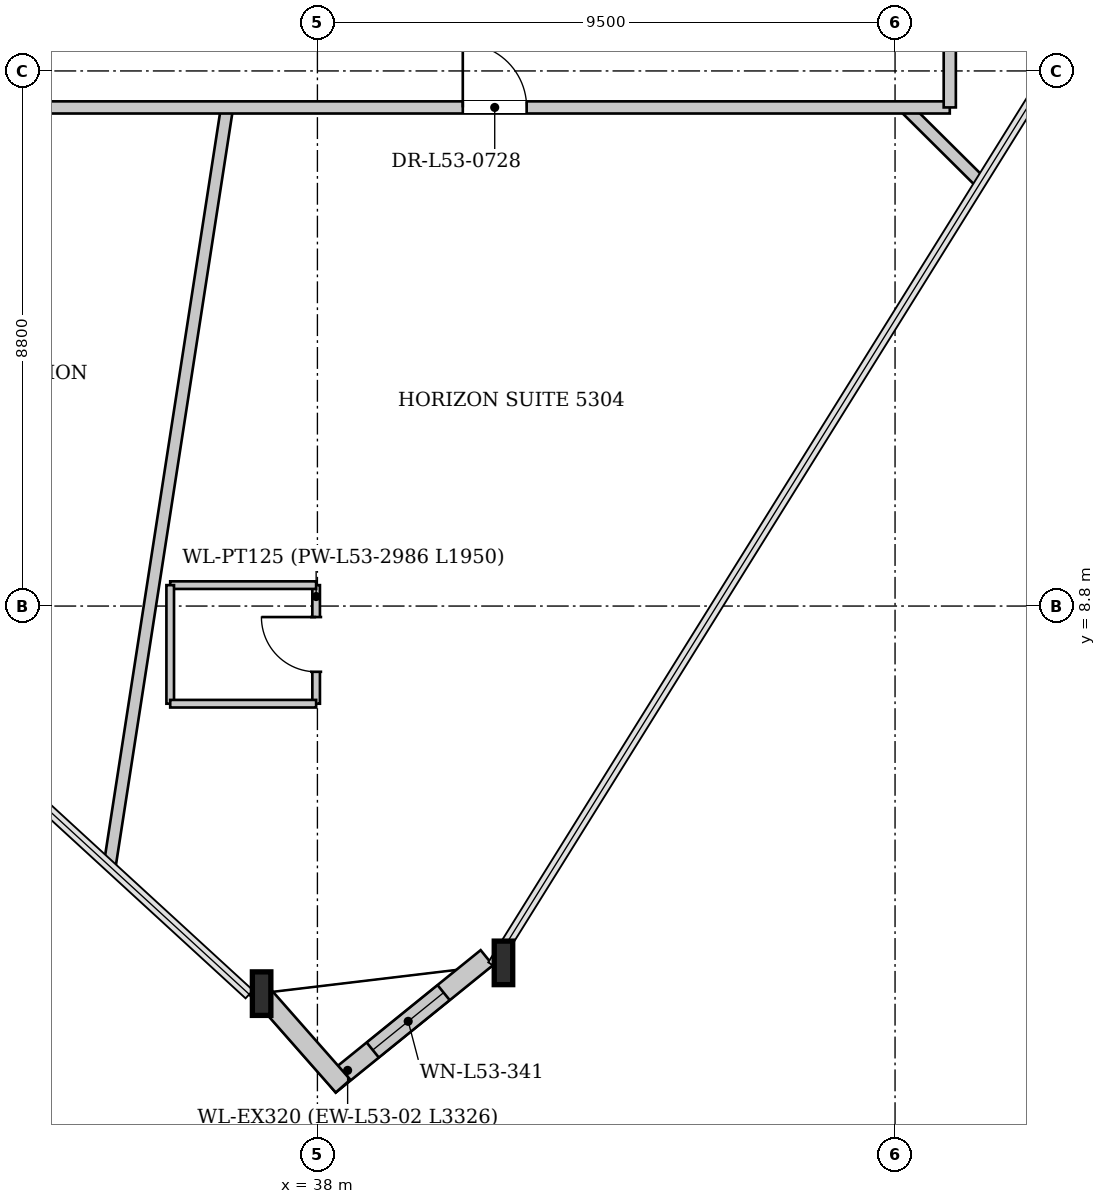
"""IFC4 building model, lengths in metres.
Left out: names, types, materials, properties, quantities, classifications, styles, units other than length and angle.
Written with IfcOpenShell. Run it as: python <this file> out.ifc"""

import sys

from ifc_helpers import new_model, si_unit, direction, frame, frame_2d, origin, origin_2d, place, context, subcontext, project, spatial, rectangle, i_section, extrude, source, transform, mapped, element, fill, save


model = new_model("IFC4")
c1 = context("Model", 3, precision=1e-05, world=origin(), true_north=direction((0.0, 1.0)))
c2 = subcontext(c1, "Body", "Model", "MODEL_VIEW")
j1 = project(units=[si_unit("LENGTHUNIT", "METRE"), si_unit("PLANEANGLEUNIT", "RADIAN")], contexts=[c1])
p1 = place(None, origin())
s1 = spatial("IfcSite", under=j1, at=p1, CompositionType="ELEMENT")
p2 = place(p1, origin())
s2 = spatial("IfcBuilding", under=s1, at=p2, CompositionType="ELEMENT")
p3 = place(p2, frame((0.0, 0.0, 200.3)))
s3 = spatial("IfcBuildingStorey", under=s2, at=p3, CompositionType="ELEMENT", Elevation=200.3)
m1 = source(origin(), c2, "Body", "SweptSolid", [
    extrude(i_section(OverallWidth=0.304, OverallDepth=0.716, WebThickness=0.021, FlangeThickness=0.04, at=origin_2d()), origin(), (0.0, 0.0, 1.0), 3.856),
])
p4 = place(p3, frame((36.879, 2.415, 0.0), z_axis=(0.105342028632, 0.005887505206, 0.994418621249), x_axis=(-0.055802338167, 0.998441835589, 0.0)))
e1 = element("IfcColumn", 1, at=p4, inside=s3, PredefinedType="COLUMN", context=c2, shape_type="MappedRepresentation", body=[
    mapped(m1, transform((0.0, 0.0, 0.0), x_axis=(1.0, 0.0, 0.0), y_axis=(0.0, 1.0, 0.0), z_axis=(0.0, 0.0, 1.0), scale=1.0)),
])
m2 = source(origin(), c2, "Body", "SweptSolid", [
    extrude(i_section(OverallWidth=0.304, OverallDepth=0.716, WebThickness=0.021, FlangeThickness=0.04, at=origin_2d()), origin(), (0.0, 0.0, 1.0), 3.852),
])
p5 = place(p3, frame((40.886, 2.893, 0.0), z_axis=(0.090202649582, 0.02034789214, 0.995715544367), x_axis=(-0.220050460577, 0.975488490347, 0.0)))
e2 = element("IfcColumn", 2, at=p5, inside=s3, PredefinedType="COLUMN", context=c2, shape_type="MappedRepresentation", body=[
    mapped(m2, transform((0.0, 0.0, 0.0), x_axis=(1.0, 0.0, 0.0), y_axis=(0.0, 1.0, 0.0), z_axis=(0.0, 0.0, 1.0), scale=1.0)),
])
p6 = place(p3, frame((40.785, 3.017, 0.0), z_axis=(0.0, 0.0, 1.0), x_axis=(-0.77721751888, -0.629232014718, 0.0)))
e3 = element("IfcWall", 3, at=p6, inside=s3, PredefinedType="SOLIDWALL", context=c2, shape_type="SweptSolid", body=[
    extrude(rectangle(XDim=3.326, YDim=0.32, at=frame_2d((1.663, 0.0))), origin(), (0.0, 0.0, 1.0), 2.972),
])
p7 = place(p6, frame((0.913, 0.0, 0.552)))
e4 = element("IfcOpeningElement", 4, at=p7, cuts=e3, PredefinedType="OPENING", context=c2, shape_type="SweptSolid", body=[
    extrude(rectangle(XDim=1.5, YDim=2.3, at=frame_2d((0.75, 1.15))), frame((0.0, 0.17, 0.0), z_axis=(0.0, -1.0, 0.0), x_axis=(1.0, 0.0, 0.0)), (0.0, 0.0, 1.0), 0.34),
])
p8 = place(p3, frame((38.421, 0.906, 0.0), z_axis=(0.0, 0.0, 1.0), x_axis=(-0.660863197415, 0.750506385251, 0.0)))
e5 = element("IfcWall", 5, at=p8, inside=s3, PredefinedType="SOLIDWALL", context=c2, shape_type="SweptSolid", body=[
    extrude(rectangle(XDim=2.152, YDim=0.32, at=frame_2d((1.076, 0.0))), origin(), (0.0, 0.0, 1.0), 2.972),
])
p9 = place(p3, frame((36.514, 17.0, 0.0), z_axis=(0.0, 0.0, 1.0), x_axis=(-0.152982434714, -0.988228908031, 0.0)))
e6 = element("IfcWall", 6, at=p9, inside=s3, PredefinedType="PARTITIONING", context=c2, shape_type="SweptSolid", body=[
    extrude(rectangle(XDim=12.59, YDim=0.2, at=frame_2d((6.295, 0.0))), origin(), (0.0, 0.0, 1.0), 3.58),
])
p10 = place(p3, frame((47.667, 17.0, 0.0), z_axis=(0.0, 0.0, 1.0), x_axis=(0.709519367243, -0.704685935369, 0.0)))
e7 = element("IfcWall", 7, at=p10, inside=s3, PredefinedType="PARTITIONING", context=c2, shape_type="SweptSolid", body=[
    extrude(rectangle(XDim=1.717, YDim=0.2, at=frame_2d((0.859, 0.0))), origin(), (0.0, 0.0, 1.0), 3.58),
])
p11 = place(p3, frame((37.979, 7.194, 0.0), z_axis=(0.0, 0.0, 1.0), x_axis=(0.0, 1.0, 0.0)))
e8 = element("IfcWall", 8, at=p11, inside=s3, PredefinedType="PARTITIONING", context=c2, shape_type="SweptSolid", body=[
    extrude(rectangle(XDim=1.95, YDim=0.125, at=frame_2d((0.975, 0.0))), origin(), (0.0, 0.0, 1.0), 3.58),
])
p12 = place(p11, frame((0.525, 0.0, 0.0)))
e9 = element("IfcOpeningElement", 9, at=p12, cuts=e8, PredefinedType="OPENING", context=c2, shape_type="SweptSolid", body=[
    extrude(rectangle(XDim=0.9, YDim=2.1, at=frame_2d((0.45, 1.05))), frame((0.0, 0.073, 0.0), z_axis=(0.0, -1.0, 0.0), x_axis=(1.0, 0.0, 0.0)), (0.0, 0.0, 1.0), 0.145),
])
p13 = place(p3, frame((37.979, 9.144, 0.0), z_axis=(0.0, 0.0, 1.0), x_axis=(-1.0, 0.0, 0.0)))
e10 = element("IfcWall", 10, at=p13, inside=s3, PredefinedType="PARTITIONING", context=c2, shape_type="SweptSolid", body=[
    extrude(rectangle(XDim=2.4, YDim=0.125, at=frame_2d((1.2, 0.0))), origin(), (0.0, 0.0, 1.0), 3.58),
])
p14 = place(p3, frame((35.579, 9.144, 0.0), z_axis=(0.0, 0.0, 1.0), x_axis=(0.0, -1.0, 0.0)))
e11 = element("IfcWall", 11, at=p14, inside=s3, PredefinedType="PARTITIONING", context=c2, shape_type="SweptSolid", body=[
    extrude(rectangle(XDim=1.95, YDim=0.125, at=frame_2d((0.975, 0.0))), origin(), (0.0, 0.0, 1.0), 3.58),
])
p15 = place(p3, frame((35.579, 7.194, 0.0), z_axis=(0.0, 0.0, 1.0), x_axis=(1.0, 0.0, 0.0)))
e12 = element("IfcWall", 12, at=p15, inside=s3, PredefinedType="PARTITIONING", context=c2, shape_type="SweptSolid", body=[
    extrude(rectangle(XDim=2.4, YDim=0.125, at=frame_2d((1.2, 0.0))), origin(), (0.0, 0.0, 1.0), 3.58),
])
p16 = place(p3, frame((27.6, 17.0, 0.0), z_axis=(0.0, 0.0, 1.0), x_axis=(1.0, 0.0, 0.0)))
e13 = element("IfcWall", 13, at=p16, inside=s3, PredefinedType="PARTITIONING", context=c2, shape_type="SweptSolid", body=[
    extrude(rectangle(XDim=20.8, YDim=0.2, at=frame_2d((10.4, 0.0))), origin(), (0.0, 0.0, 1.0), 3.58),
])
p17 = place(p16, frame((4.254, 0.0, 0.0)))
e14 = element("IfcOpeningElement", 14, at=p17, cuts=e13, PredefinedType="OPENING", context=c2, shape_type="SweptSolid", body=[
    extrude(rectangle(XDim=1.05, YDim=2.2, at=frame_2d((0.525, 1.1))), frame((0.0, 0.11, 0.0), z_axis=(0.0, -1.0, 0.0), x_axis=(1.0, 0.0, 0.0)), (0.0, 0.0, 1.0), 0.22),
])
p18 = place(p16, frame((12.791, 0.0, 0.0)))
e15 = element("IfcOpeningElement", 15, at=p18, cuts=e13, PredefinedType="OPENING", context=c2, shape_type="SweptSolid", body=[
    extrude(rectangle(XDim=1.05, YDim=2.2, at=frame_2d((0.525, 1.1))), frame((0.0, 0.11, 0.0), z_axis=(0.0, -1.0, 0.0), x_axis=(1.0, 0.0, 0.0)), (0.0, 0.0, 1.0), 0.22),
])
p19 = place(p3, frame((48.4, 17.0, 0.0), z_axis=(0.0, 0.0, 1.0), x_axis=(0.0, 1.0, 0.0)))
e16 = element("IfcWall", 16, at=p19, inside=s3, PredefinedType="PARTITIONING", context=c2, shape_type="SweptSolid", body=[
    extrude(rectangle(XDim=19.2, YDim=0.2, at=frame_2d((9.6, 0.0))), origin(), (0.0, 0.0, 1.0), 3.58),
])
p20 = place(p19, frame((8.165, 0.0, 0.0)))
e17 = element("IfcOpeningElement", 17, at=p20, cuts=e16, PredefinedType="OPENING", context=c2, shape_type="SweptSolid", body=[
    extrude(rectangle(XDim=1.05, YDim=2.2, at=frame_2d((0.525, 1.1))), frame((0.0, 0.11, 0.0), z_axis=(0.0, -1.0, 0.0), x_axis=(1.0, 0.0, 0.0)), (0.0, 0.0, 1.0), 0.22),
])
m3 = source(origin(), c2, "Body", "SweptSolid", [
    extrude(rectangle(XDim=1.5, YDim=2.3, at=frame_2d((0.75, 1.15))), frame((0.0, 0.03, 0.0), z_axis=(0.0, -1.0, 0.0), x_axis=(1.0, 0.0, 0.0)), (0.0, 0.0, 1.0), 0.06),
])
p21 = place(p7, origin())
e18 = element("IfcWindow", 18, at=p21, inside=s3, PartitioningType="SINGLE_PANEL", PredefinedType="WINDOW", context=c2, shape_type="MappedRepresentation", body=[
    mapped(m3, transform((0.0, 0.0, 0.0), x_axis=(1.0, 0.0, 0.0), y_axis=(0.0, 1.0, 0.0), z_axis=(0.0, 0.0, 1.0), scale=1.0)),
])
fill(e4, e18)
m4 = source(origin(), c2, "Body", "SweptSolid", [
    extrude(rectangle(XDim=0.9, YDim=2.1, at=frame_2d((0.45, 1.05))), frame((0.0, 0.025, 0.0), z_axis=(0.0, -1.0, 0.0), x_axis=(1.0, 0.0, 0.0)), (0.0, 0.0, 1.0), 0.05),
])
p22 = place(p12, origin())
e19 = element("IfcDoor", 19, at=p22, inside=s3, OperationType="SINGLE_SWING_RIGHT", PredefinedType="DOOR", context=c2, shape_type="MappedRepresentation", body=[
    mapped(m4, transform((0.0, 0.0, 0.0), x_axis=(1.0, 0.0, 0.0), y_axis=(0.0, 1.0, 0.0), z_axis=(0.0, 0.0, 1.0), scale=1.0)),
])
fill(e9, e19)
m5 = source(origin(), c2, "Body", "SweptSolid", [
    extrude(rectangle(XDim=1.05, YDim=2.2, at=frame_2d((0.525, 1.1))), frame((0.0, 0.025, 0.0), z_axis=(0.0, -1.0, 0.0), x_axis=(1.0, 0.0, 0.0)), (0.0, 0.0, 1.0), 0.05),
])
p23 = place(p18, origin())
e20 = element("IfcDoor", 20, at=p23, inside=s3, OperationType="SINGLE_SWING_LEFT", PredefinedType="DOOR", context=c2, shape_type="MappedRepresentation", body=[
    mapped(m5, transform((0.0, 0.0, 0.0), x_axis=(1.0, 0.0, 0.0), y_axis=(0.0, 1.0, 0.0), z_axis=(0.0, 0.0, 1.0), scale=1.0)),
])
fill(e15, e20)
save(model, sys.argv[1])
